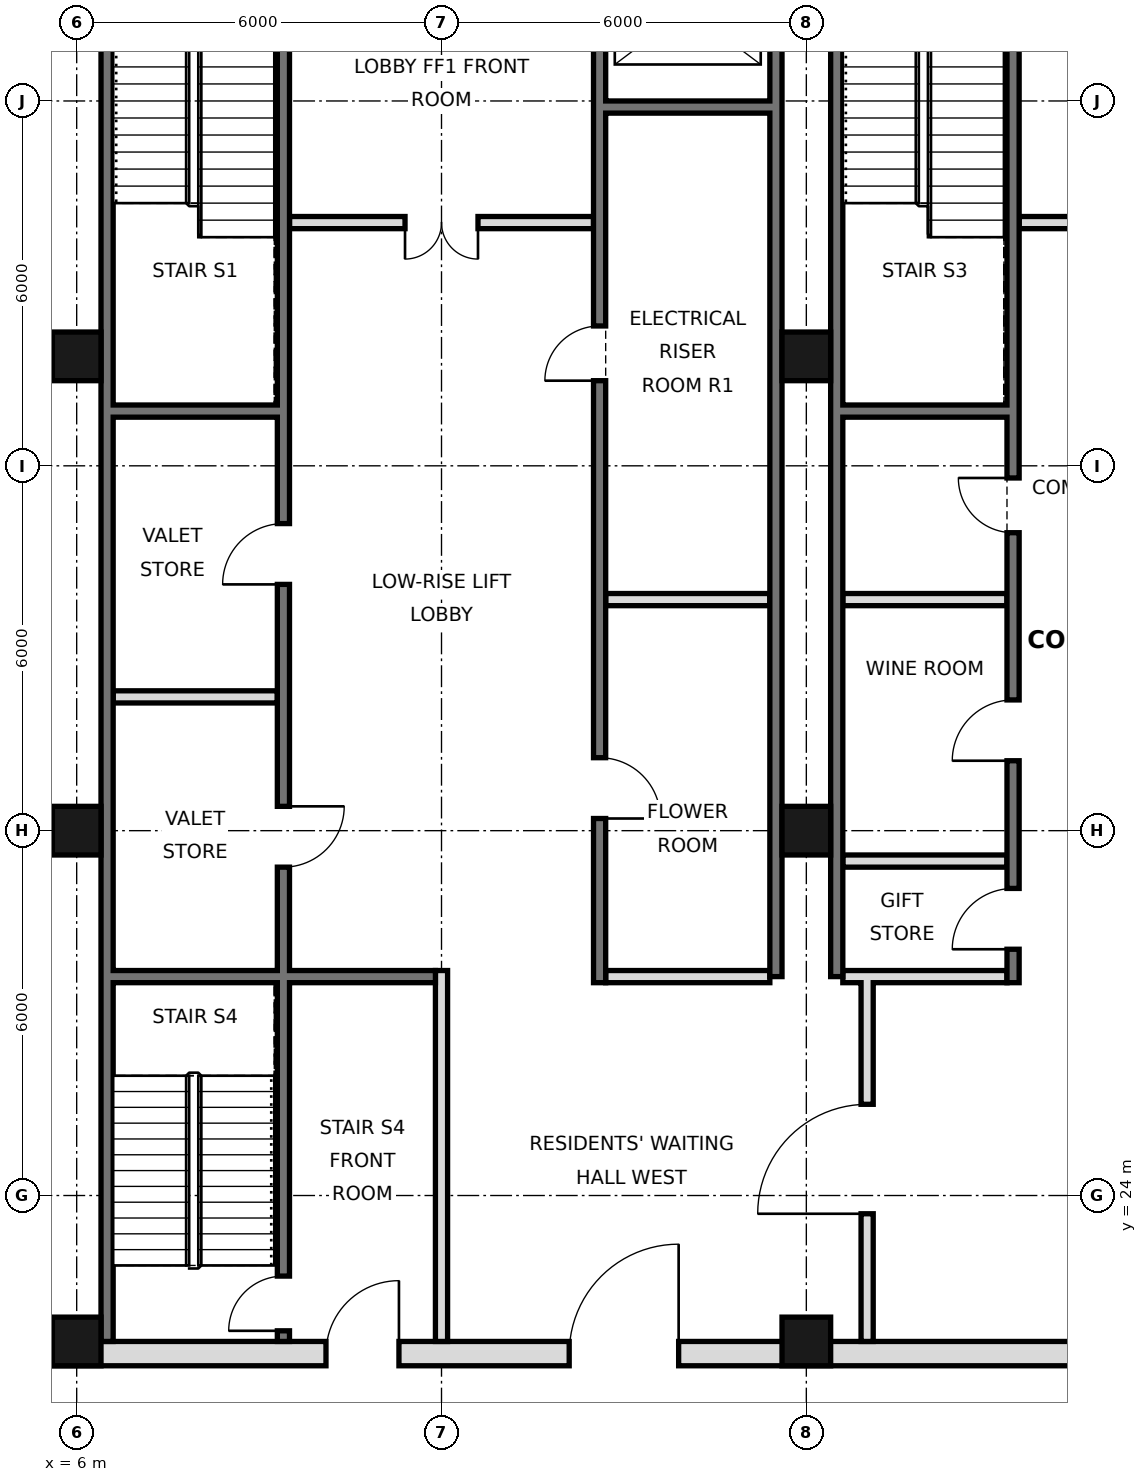
"""IFC4 building model, lengths in metres.
Left out: names, types, materials, properties, quantities, classifications, styles, units other than length and angle.
Written with IfcOpenShell. Run it as: python <this file> out.ifc"""

import sys

from ifc_helpers import new_model, si_unit, direction, frame, frame_2d, origin, origin_2d, place, context, subcontext, project, spatial, rectangle, hollow_rectangle, extrude, element, fill, save


model = new_model("IFC4")
c1 = context("Model", 3, precision=1e-05, world=origin(), true_north=direction((0.0, 1.0)))
c2 = subcontext(c1, "Body", "Model", "MODEL_VIEW")
j1 = project(units=[si_unit("LENGTHUNIT", "METRE"), si_unit("PLANEANGLEUNIT", "RADIAN")], contexts=[c1])
p1 = place(None, origin())
s1 = spatial("IfcSite", under=j1, at=p1, CompositionType="ELEMENT")
p2 = place(p1, origin())
s2 = spatial("IfcBuilding", under=s1, at=p2, CompositionType="ELEMENT")
p3 = place(p2, frame((0.0, 0.0, 229.8)))
s3 = spatial("IfcBuildingStorey", under=s2, at=p3, CompositionType="ELEMENT", Elevation=229.8)
for number, where, z_axis, x_axis in (
    (1, (6.0, 21.6, 0.0), (0.0, 0.0, 1.0), (1.0, 0.0, 0.0)),
    (2, (6.0, 30.0, 0.0), (0.0, 0.0, 1.0), (1.0, 0.0, 0.0)),
    (3, (6.0, 37.8, 0.0), (0.0, 0.0, 1.0), (1.0, 0.0, 0.0)),
    (4, (18.0, 21.6, 0.0), (0.0, 0.0, 1.0), (1.0, 0.0, 0.0)),
    (5, (18.0, 30.0, 0.0), (0.0, 0.0, 1.0), (1.0, 0.0, 0.0)),
    (6, (18.0, 37.8, 0.0), (0.0, 0.0, 1.0), (1.0, 0.0, 0.0)),
):
    element("IfcColumn", number, at=place(p3, frame(where, z_axis=z_axis, x_axis=x_axis)), inside=s3, PredefinedType="COLUMN", context=c2, shape_type="SweptSolid", body=[
        extrude(hollow_rectangle(XDim=0.8, YDim=0.8, WallThickness=0.04, at=origin_2d()), origin(), (0.0, 0.0, 1.0), 4.4),
    ])
p4 = place(p3, frame((6.5, 21.6, 0.0), z_axis=(0.0, 0.0, 1.0), x_axis=(0.0, 1.0, 0.0)))
e7 = element("IfcWall", 7, at=p4, inside=s3, PredefinedType="SOLIDWALL", context=c2, shape_type="SweptSolid", body=[
    extrude(rectangle(XDim=23.5, YDim=0.2, at=frame_2d((11.75, 0.0))), origin(), (0.0, 0.0, 1.0), 4.1),
])
for number, where, z_axis, x_axis in (
    (8, (17.5, 27.6, 0.0), (0.0, 0.0, 1.0), (0.0, 1.0, 0.0)),
    (9, (18.5, 27.6, 0.0), (0.0, 0.0, 1.0), (0.0, 1.0, 0.0)),
):
    element("IfcWall", number, at=place(p3, frame(where, z_axis=z_axis, x_axis=x_axis)), inside=s3, PredefinedType="SOLIDWALL", context=c2, shape_type="SweptSolid", body=[
        extrude(rectangle(XDim=17.5, YDim=0.2, at=frame_2d((8.75, 0.0))), origin(), (0.0, 0.0, 1.0), 4.1),
    ])
p5 = place(p3, frame((5.6, 21.4, 0.0), z_axis=(0.0, 0.0, 1.0), x_axis=(1.0, 0.0, 0.0)))
e10 = element("IfcWall", 10, at=p5, inside=s3, PredefinedType="SOLIDWALL", context=c2, shape_type="SweptSolid", body=[
    extrude(rectangle(XDim=36.8, YDim=0.4, at=frame_2d((18.4, 0.0))), origin(), (0.0, 0.0, 1.0), 4.1),
])
p6 = place(p5, frame((8.5, 0.0, 0.0)))
e11 = element("IfcOpeningElement", 11, at=p6, cuts=e10, PredefinedType="OPENING", context=c2, shape_type="SweptSolid", body=[
    extrude(rectangle(XDim=1.8, YDim=2.1, at=frame_2d((0.9, 1.05))), frame((0.0, 0.21, 0.0), z_axis=(0.0, -1.0, 0.0), x_axis=(1.0, 0.0, 0.0)), (0.0, 0.0, 1.0), 0.42),
])
p7 = place(p5, frame((17.5, 0.0, 0.0)))
e12 = element("IfcOpeningElement", 12, at=p7, cuts=e10, PredefinedType="OPENING", context=c2, shape_type="SweptSolid", body=[
    extrude(rectangle(XDim=1.8, YDim=2.1, at=frame_2d((0.9, 1.05))), frame((0.0, 0.21, 0.0), z_axis=(0.0, -1.0, 0.0), x_axis=(1.0, 0.0, 0.0)), (0.0, 0.0, 1.0), 0.42),
])
p8 = place(p5, frame((26.5, 0.0, 0.0)))
e13 = element("IfcOpeningElement", 13, at=p8, cuts=e10, PredefinedType="OPENING", context=c2, shape_type="SweptSolid", body=[
    extrude(rectangle(XDim=1.8, YDim=2.1, at=frame_2d((0.9, 1.05))), frame((0.0, 0.21, 0.0), z_axis=(0.0, -1.0, 0.0), x_axis=(1.0, 0.0, 0.0)), (0.0, 0.0, 1.0), 0.42),
])
p9 = place(p5, frame((4.5, 0.0, 0.0)))
e14 = element("IfcOpeningElement", 14, at=p9, cuts=e10, PredefinedType="OPENING", context=c2, shape_type="SweptSolid", body=[
    extrude(rectangle(XDim=1.2, YDim=2.1, at=frame_2d((0.6, 1.05))), frame((0.0, 0.21, 0.0), z_axis=(0.0, -1.0, 0.0), x_axis=(1.0, 0.0, 0.0)), (0.0, 0.0, 1.0), 0.42),
])
p10 = place(p5, frame((31.1, 0.0, 0.0)))
e15 = element("IfcOpeningElement", 15, at=p10, cuts=e10, PredefinedType="OPENING", context=c2, shape_type="SweptSolid", body=[
    extrude(rectangle(XDim=1.2, YDim=2.1, at=frame_2d((0.6, 1.05))), frame((0.0, 0.21, 0.0), z_axis=(0.0, -1.0, 0.0), x_axis=(1.0, 0.0, 0.0)), (0.0, 0.0, 1.0), 0.42),
])
p11 = place(p3, frame((19.0, 21.6, 0.0), z_axis=(0.0, 0.0, 1.0), x_axis=(0.0, 1.0, 0.0)))
e16 = element("IfcWall", 16, at=p11, inside=s3, PredefinedType="PARTITIONING", context=c2, shape_type="SweptSolid", body=[
    extrude(rectangle(XDim=6.0, YDim=0.2, at=frame_2d((3.0, 0.0))), origin(), (0.0, 0.0, 1.0), 4.1),
])
p12 = place(p11, frame((2.1, 0.0, 0.0)))
e17 = element("IfcOpeningElement", 17, at=p12, cuts=e16, PredefinedType="OPENING", context=c2, shape_type="SweptSolid", body=[
    extrude(rectangle(XDim=1.8, YDim=2.1, at=frame_2d((0.9, 1.05))), frame((0.0, 0.11, 0.0), z_axis=(0.0, -1.0, 0.0), x_axis=(1.0, 0.0, 0.0)), (0.0, 0.0, 1.0), 0.22),
])
p13 = place(p3, frame((12.0, 21.6, 0.0), z_axis=(0.0, 0.0, 1.0), x_axis=(0.0, 1.0, 0.0)))
e18 = element("IfcWall", 18, at=p13, inside=s3, PredefinedType="PARTITIONING", context=c2, shape_type="SweptSolid", body=[
    extrude(rectangle(XDim=6.1, YDim=0.2, at=frame_2d((3.05, 0.0))), origin(), (0.0, 0.0, 1.0), 4.1),
])
p14 = place(p3, frame((14.6, 27.5, 0.0), z_axis=(0.0, 0.0, 1.0), x_axis=(0.0, 1.0, 0.0)))
e19 = element("IfcWall", 19, at=p14, inside=s3, PredefinedType="SOLIDWALL", context=c2, shape_type="SweptSolid", body=[
    extrude(rectangle(XDim=17.5, YDim=0.2, at=frame_2d((8.75, 0.0))), origin(), (0.0, 0.0, 1.0), 4.1),
])
p15 = place(p14, frame((15.4, 0.0, 0.0)))
e20 = element("IfcOpeningElement", 20, at=p15, cuts=e19, PredefinedType="OPENING", context=c2, shape_type="SweptSolid", body=[
    extrude(rectangle(XDim=1.1, YDim=2.1, at=frame_2d((0.55, 1.05))), frame((0.0, 0.11, 0.0), z_axis=(0.0, -1.0, 0.0), x_axis=(1.0, 0.0, 0.0)), (0.0, 0.0, 1.0), 0.22),
])
p16 = place(p14, frame((2.7, 0.0, 0.0)))
e21 = element("IfcOpeningElement", 21, at=p16, cuts=e19, PredefinedType="OPENING", context=c2, shape_type="SweptSolid", body=[
    extrude(rectangle(XDim=1.0, YDim=2.1, at=frame_2d((0.5, 1.05))), frame((0.0, 0.11, 0.0), z_axis=(0.0, -1.0, 0.0), x_axis=(1.0, 0.0, 0.0)), (0.0, 0.0, 1.0), 0.22),
])
p17 = place(p14, frame((9.9, 0.0, 0.0)))
e22 = element("IfcOpeningElement", 22, at=p17, cuts=e19, PredefinedType="OPENING", context=c2, shape_type="SweptSolid", body=[
    extrude(rectangle(XDim=0.9, YDim=2.1, at=frame_2d((0.45, 1.05))), frame((0.0, 0.11, 0.0), z_axis=(0.0, -1.0, 0.0), x_axis=(1.0, 0.0, 0.0)), (0.0, 0.0, 1.0), 0.22),
])
p18 = place(p3, frame((21.4, 27.5, 0.0), z_axis=(0.0, 0.0, 1.0), x_axis=(0.0, 1.0, 0.0)))
e23 = element("IfcWall", 23, at=p18, inside=s3, PredefinedType="SOLIDWALL", context=c2, shape_type="SweptSolid", body=[
    extrude(rectangle(XDim=17.5, YDim=0.2, at=frame_2d((8.75, 0.0))), origin(), (0.0, 0.0, 1.0), 4.1),
])
p19 = place(p18, frame((0.55, 0.0, 0.0)))
e24 = element("IfcOpeningElement", 24, at=p19, cuts=e23, PredefinedType="OPENING", context=c2, shape_type="SweptSolid", body=[
    extrude(rectangle(XDim=1.0, YDim=2.1, at=frame_2d((0.5, 1.05))), frame((0.0, 0.11, 0.0), z_axis=(0.0, -1.0, 0.0), x_axis=(1.0, 0.0, 0.0)), (0.0, 0.0, 1.0), 0.22),
])
p20 = place(p18, frame((3.65, 0.0, 0.0)))
e25 = element("IfcOpeningElement", 25, at=p20, cuts=e23, PredefinedType="OPENING", context=c2, shape_type="SweptSolid", body=[
    extrude(rectangle(XDim=1.0, YDim=2.1, at=frame_2d((0.5, 1.05))), frame((0.0, 0.11, 0.0), z_axis=(0.0, -1.0, 0.0), x_axis=(1.0, 0.0, 0.0)), (0.0, 0.0, 1.0), 0.22),
])
p21 = place(p18, frame((16.2, 0.0, 0.0)))
e26 = element("IfcOpeningElement", 26, at=p21, cuts=e23, PredefinedType="OPENING", context=c2, shape_type="SweptSolid", body=[
    extrude(rectangle(XDim=1.0, YDim=2.1, at=frame_2d((0.5, 1.05))), frame((0.0, 0.11, 0.0), z_axis=(0.0, -1.0, 0.0), x_axis=(1.0, 0.0, 0.0)), (0.0, 0.0, 1.0), 0.22),
])
p22 = place(p18, frame((7.4, 0.0, 0.0)))
e27 = element("IfcOpeningElement", 27, at=p22, cuts=e23, PredefinedType="OPENING", context=c2, shape_type="SweptSolid", body=[
    extrude(rectangle(XDim=0.9, YDim=2.1, at=frame_2d((0.45, 1.05))), frame((0.0, 0.11, 0.0), z_axis=(0.0, -1.0, 0.0), x_axis=(1.0, 0.0, 0.0)), (0.0, 0.0, 1.0), 0.22),
])
p23 = place(p3, frame((9.4, 21.6, 0.0), z_axis=(0.0, 0.0, 1.0), x_axis=(0.0, 1.0, 0.0)))
e28 = element("IfcWall", 28, at=p23, inside=s3, PredefinedType="SOLIDWALL", context=c2, shape_type="SweptSolid", body=[
    extrude(rectangle(XDim=23.4, YDim=0.2, at=frame_2d((11.7, 0.0))), origin(), (0.0, 0.0, 1.0), 4.1),
])
p24 = place(p23, frame((7.8, 0.0, 0.0)))
e29 = element("IfcOpeningElement", 29, at=p24, cuts=e28, PredefinedType="OPENING", context=c2, shape_type="SweptSolid", body=[
    extrude(rectangle(XDim=1.0, YDim=2.1, at=frame_2d((0.5, 1.05))), frame((0.0, 0.11, 0.0), z_axis=(0.0, -1.0, 0.0), x_axis=(1.0, 0.0, 0.0)), (0.0, 0.0, 1.0), 0.22),
])
p25 = place(p23, frame((12.45, 0.0, 0.0)))
e30 = element("IfcOpeningElement", 30, at=p25, cuts=e28, PredefinedType="OPENING", context=c2, shape_type="SweptSolid", body=[
    extrude(rectangle(XDim=1.0, YDim=2.1, at=frame_2d((0.5, 1.05))), frame((0.0, 0.11, 0.0), z_axis=(0.0, -1.0, 0.0), x_axis=(1.0, 0.0, 0.0)), (0.0, 0.0, 1.0), 0.22),
])
p26 = place(p23, frame((22.1, 0.0, 0.0)))
e31 = element("IfcOpeningElement", 31, at=p26, cuts=e28, PredefinedType="OPENING", context=c2, shape_type="SweptSolid", body=[
    extrude(rectangle(XDim=1.0, YDim=2.1, at=frame_2d((0.5, 1.05))), frame((0.0, 0.11, 0.0), z_axis=(0.0, -1.0, 0.0), x_axis=(1.0, 0.0, 0.0)), (0.0, 0.0, 1.0), 0.22),
])
p27 = place(p23, frame((0.175, 0.0, 0.0)))
e32 = element("IfcOpeningElement", 32, at=p27, cuts=e28, PredefinedType="OPENING", context=c2, shape_type="SweptSolid", body=[
    extrude(rectangle(XDim=0.9, YDim=2.1, at=frame_2d((0.45, 1.05))), frame((0.0, 0.11, 0.0), z_axis=(0.0, -1.0, 0.0), x_axis=(1.0, 0.0, 0.0)), (0.0, 0.0, 1.0), 0.22),
])
for number, where, z_axis, x_axis in (
    (33, (14.7, 27.6, 0.0), (0.0, 0.0, 1.0), (1.0, 0.0, 0.0)),
    (34, (18.6, 27.6, 0.0), (0.0, 0.0, 1.0), (1.0, 0.0, 0.0)),
):
    element("IfcWall", number, at=place(p3, frame(where, z_axis=z_axis, x_axis=x_axis)), inside=s3, PredefinedType="PARTITIONING", context=c2, shape_type="SweptSolid", body=[
        extrude(rectangle(XDim=2.7, YDim=0.2, at=frame_2d((1.35, 0.0))), origin(), (0.0, 0.0, 1.0), 4.1),
    ])
p28 = place(p3, frame((6.6, 27.6, 0.0), z_axis=(0.0, 0.0, 1.0), x_axis=(1.0, 0.0, 0.0)))
e35 = element("IfcWall", 35, at=p28, inside=s3, PredefinedType="SOLIDWALL", context=c2, shape_type="SweptSolid", body=[
    extrude(rectangle(XDim=5.3, YDim=0.2, at=frame_2d((2.65, 0.0))), origin(), (0.0, 0.0, 1.0), 4.1),
])
for number, where, z_axis, x_axis in (
    (36, (18.6, 29.5, 0.0), (0.0, 0.0, 1.0), (1.0, 0.0, 0.0)),
    (37, (6.6, 32.2, 0.0), (0.0, 0.0, 1.0), (1.0, 0.0, 0.0)),
):
    element("IfcWall", number, at=place(p3, frame(where, z_axis=z_axis, x_axis=x_axis)), inside=s3, PredefinedType="PARTITIONING", context=c2, shape_type="SweptSolid", body=[
        extrude(rectangle(XDim=2.7, YDim=0.2, at=frame_2d((1.35, 0.0))), origin(), (0.0, 0.0, 1.0), 4.1),
    ])
for number, where, z_axis, x_axis in (
    (38, (14.7, 33.8, 0.0), (0.0, 0.0, 1.0), (1.0, 0.0, 0.0)),
    (39, (18.6, 33.8, 0.0), (0.0, 0.0, 1.0), (1.0, 0.0, 0.0)),
    (40, (18.6, 36.9, 0.0), (0.0, 0.0, 1.0), (1.0, 0.0, 0.0)),
    (41, (6.6, 36.9, 0.0), (0.0, 0.0, 1.0), (1.0, 0.0, 0.0)),
):
    element("IfcWall", number, at=place(p3, frame(where, z_axis=z_axis, x_axis=x_axis)), inside=s3, PredefinedType="SOLIDWALL", context=c2, shape_type="SweptSolid", body=[
        extrude(rectangle(XDim=2.7, YDim=0.2, at=frame_2d((1.35, 0.0))), origin(), (0.0, 0.0, 1.0), 4.1),
    ])
p29 = place(p3, frame((21.5, 40.0, 0.0), z_axis=(0.0, 0.0, 1.0), x_axis=(1.0, 0.0, 0.0)))
e42 = element("IfcWall", 42, at=p29, inside=s3, PredefinedType="PARTITIONING", context=c2, shape_type="SweptSolid", body=[
    extrude(rectangle(XDim=5.0, YDim=0.2, at=frame_2d((2.5, 0.0))), origin(), (0.0, 0.0, 1.0), 4.1),
])
p30 = place(p29, frame((1.9, 0.0, 0.0)))
e43 = element("IfcOpeningElement", 43, at=p30, cuts=e42, PredefinedType="OPENING", context=c2, shape_type="SweptSolid", body=[
    extrude(rectangle(XDim=1.2, YDim=2.1, at=frame_2d((0.6, 1.05))), frame((0.0, 0.11, 0.0), z_axis=(0.0, -1.0, 0.0), x_axis=(1.0, 0.0, 0.0)), (0.0, 0.0, 1.0), 0.22),
])
p31 = place(p3, frame((9.5, 40.0, 0.0), z_axis=(0.0, 0.0, 1.0), x_axis=(1.0, 0.0, 0.0)))
e44 = element("IfcWall", 44, at=p31, inside=s3, PredefinedType="PARTITIONING", context=c2, shape_type="SweptSolid", body=[
    extrude(rectangle(XDim=5.0, YDim=0.2, at=frame_2d((2.5, 0.0))), origin(), (0.0, 0.0, 1.0), 4.1),
])
p32 = place(p31, frame((1.9, 0.0, 0.0)))
e45 = element("IfcOpeningElement", 45, at=p32, cuts=e44, PredefinedType="OPENING", context=c2, shape_type="SweptSolid", body=[
    extrude(rectangle(XDim=1.2, YDim=2.1, at=frame_2d((0.6, 1.05))), frame((0.0, 0.11, 0.0), z_axis=(0.0, -1.0, 0.0), x_axis=(1.0, 0.0, 0.0)), (0.0, 0.0, 1.0), 0.22),
])
p33 = place(p3, frame((14.7, 41.9, 0.0), z_axis=(0.0, 0.0, 1.0), x_axis=(1.0, 0.0, 0.0)))
e46 = element("IfcWall", 46, at=p33, inside=s3, PredefinedType="SOLIDWALL", context=c2, shape_type="SweptSolid", body=[
    extrude(rectangle(XDim=2.7, YDim=0.2, at=frame_2d((1.35, 0.0))), origin(), (0.0, 0.0, 1.0), 4.1),
])
p34 = place(p6, frame((1.8, 0.0, 0.0), z_axis=(0.0, 0.0, 1.0), x_axis=(-1.0, 0.0, 0.0)))
e47 = element("IfcDoor", 47, at=p34, inside=s3, OperationType="SINGLE_SWING_LEFT", PredefinedType="DOOR", context=c2, shape_type="SweptSolid", body=[
    extrude(rectangle(XDim=1.8, YDim=2.1, at=frame_2d((0.9, 1.05))), frame((0.0, 0.025, 0.0), z_axis=(0.0, -1.0, 0.0), x_axis=(1.0, 0.0, 0.0)), (0.0, 0.0, 1.0), 0.05),
])
fill(e11, e47)
p35 = place(p12, origin())
e48 = element("IfcDoor", 48, at=p35, inside=s3, OperationType="SINGLE_SWING_LEFT", PredefinedType="DOOR", context=c2, shape_type="SweptSolid", body=[
    extrude(rectangle(XDim=1.8, YDim=2.1, at=frame_2d((0.9, 1.05))), frame((0.0, 0.025, 0.0), z_axis=(0.0, -1.0, 0.0), x_axis=(1.0, 0.0, 0.0)), (0.0, 0.0, 1.0), 0.05),
])
fill(e17, e48)
p36 = place(p9, frame((1.2, 0.0, 0.0), z_axis=(0.0, 0.0, 1.0), x_axis=(-1.0, 0.0, 0.0)))
e49 = element("IfcDoor", 49, at=p36, inside=s3, OperationType="SINGLE_SWING_LEFT", PredefinedType="DOOR", context=c2, shape_type="SweptSolid", body=[
    extrude(rectangle(XDim=1.2, YDim=2.1, at=frame_2d((0.6, 1.05))), frame((0.0, 0.025, 0.0), z_axis=(0.0, -1.0, 0.0), x_axis=(1.0, 0.0, 0.0)), (0.0, 0.0, 1.0), 0.05),
])
fill(e14, e49)
p37 = place(p32, frame((1.2, 0.0, 0.0), z_axis=(0.0, 0.0, 1.0), x_axis=(-1.0, 0.0, 0.0)))
e50 = element("IfcDoor", 50, at=p37, inside=s3, OperationType="DOUBLE_DOOR_SINGLE_SWING", PredefinedType="DOOR", context=c2, shape_type="SweptSolid", body=[
    extrude(rectangle(XDim=1.2, YDim=2.1, at=frame_2d((0.6, 1.05))), frame((0.0, 0.025, 0.0), z_axis=(0.0, -1.0, 0.0), x_axis=(1.0, 0.0, 0.0)), (0.0, 0.0, 1.0), 0.05),
])
fill(e45, e50)
p38 = place(p19, origin())
e51 = element("IfcDoor", 51, at=p38, inside=s3, OperationType="SINGLE_SWING_LEFT", PredefinedType="DOOR", context=c2, shape_type="SweptSolid", body=[
    extrude(rectangle(XDim=1.0, YDim=2.1, at=frame_2d((0.5, 1.05))), frame((0.0, 0.025, 0.0), z_axis=(0.0, -1.0, 0.0), x_axis=(1.0, 0.0, 0.0)), (0.0, 0.0, 1.0), 0.05),
])
fill(e24, e51)
p39 = place(p20, origin())
e52 = element("IfcDoor", 52, at=p39, inside=s3, OperationType="SINGLE_SWING_LEFT", PredefinedType="DOOR", context=c2, shape_type="SweptSolid", body=[
    extrude(rectangle(XDim=1.0, YDim=2.1, at=frame_2d((0.5, 1.05))), frame((0.0, 0.025, 0.0), z_axis=(0.0, -1.0, 0.0), x_axis=(1.0, 0.0, 0.0)), (0.0, 0.0, 1.0), 0.05),
])
fill(e25, e52)
p40 = place(p16, frame((1.0, 0.0, 0.0), z_axis=(0.0, 0.0, 1.0), x_axis=(-1.0, 0.0, 0.0)))
e53 = element("IfcDoor", 53, at=p40, inside=s3, OperationType="SINGLE_SWING_RIGHT", PredefinedType="DOOR", context=c2, shape_type="SweptSolid", body=[
    extrude(rectangle(XDim=1.0, YDim=2.1, at=frame_2d((0.5, 1.05))), frame((0.0, 0.025, 0.0), z_axis=(0.0, -1.0, 0.0), x_axis=(1.0, 0.0, 0.0)), (0.0, 0.0, 1.0), 0.05),
])
fill(e21, e53)
p41 = place(p24, origin())
e54 = element("IfcDoor", 54, at=p41, inside=s3, OperationType="SINGLE_SWING_RIGHT", PredefinedType="DOOR", context=c2, shape_type="SweptSolid", body=[
    extrude(rectangle(XDim=1.0, YDim=2.1, at=frame_2d((0.5, 1.05))), frame((0.0, 0.025, 0.0), z_axis=(0.0, -1.0, 0.0), x_axis=(1.0, 0.0, 0.0)), (0.0, 0.0, 1.0), 0.05),
])
fill(e29, e54)
p42 = place(p25, origin())
e55 = element("IfcDoor", 55, at=p42, inside=s3, OperationType="SINGLE_SWING_LEFT", PredefinedType="DOOR", context=c2, shape_type="SweptSolid", body=[
    extrude(rectangle(XDim=1.0, YDim=2.1, at=frame_2d((0.5, 1.05))), frame((0.0, 0.025, 0.0), z_axis=(0.0, -1.0, 0.0), x_axis=(1.0, 0.0, 0.0)), (0.0, 0.0, 1.0), 0.05),
])
fill(e30, e55)
p43 = place(p27, origin())
e56 = element("IfcDoor", 56, at=p43, inside=s3, OperationType="SINGLE_SWING_LEFT", PredefinedType="DOOR", context=c2, shape_type="SweptSolid", body=[
    extrude(rectangle(XDim=0.9, YDim=2.1, at=frame_2d((0.45, 1.05))), frame((0.0, 0.025, 0.0), z_axis=(0.0, -1.0, 0.0), x_axis=(1.0, 0.0, 0.0)), (0.0, 0.0, 1.0), 0.05),
])
fill(e32, e56)
p44 = place(p17, origin())
e57 = element("IfcDoor", 57, at=p44, inside=s3, OperationType="SINGLE_SWING_LEFT", PredefinedType="DOOR", context=c2, shape_type="SweptSolid", body=[
    extrude(rectangle(XDim=0.9, YDim=2.1, at=frame_2d((0.45, 1.05))), frame((0.0, 0.025, 0.0), z_axis=(0.0, -1.0, 0.0), x_axis=(1.0, 0.0, 0.0)), (0.0, 0.0, 1.0), 0.05),
])
fill(e22, e57)
p45 = place(p22, frame((0.9, 0.0, 0.0), z_axis=(0.0, 0.0, 1.0), x_axis=(-1.0, 0.0, 0.0)))
e58 = element("IfcDoor", 58, at=p45, inside=s3, OperationType="SINGLE_SWING_LEFT", PredefinedType="DOOR", context=c2, shape_type="SweptSolid", body=[
    extrude(rectangle(XDim=0.9, YDim=2.1, at=frame_2d((0.45, 1.05))), frame((0.0, 0.025, 0.0), z_axis=(0.0, -1.0, 0.0), x_axis=(1.0, 0.0, 0.0)), (0.0, 0.0, 1.0), 0.05),
])
fill(e27, e58)
save(model, sys.argv[1])
